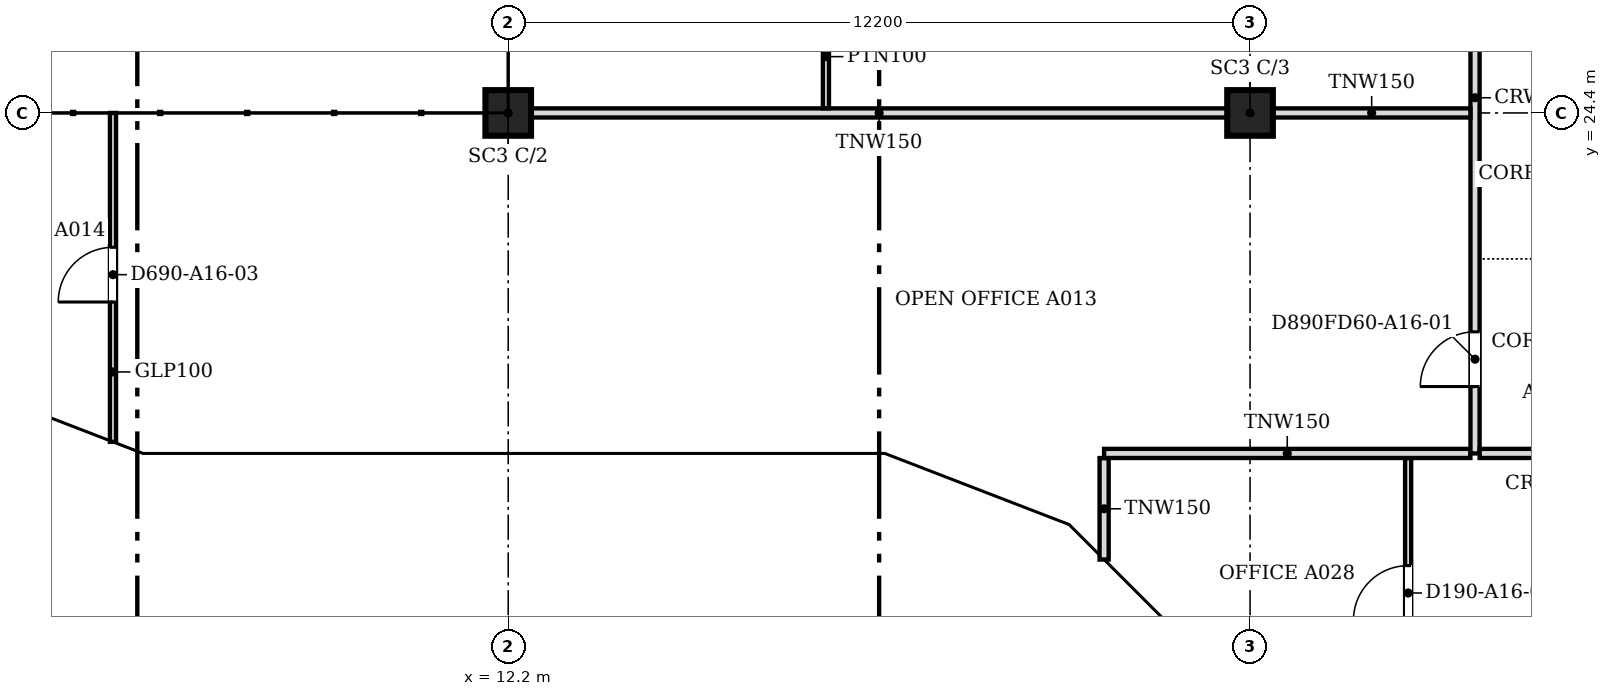
"""IFC4 building model, lengths in metres.
Left out: names, types, materials, properties, quantities, classifications, styles, units other than length and angle.
Written with IfcOpenShell. Run it as: python <this file> out.ifc"""

import sys

from ifc_helpers import new_model, si_unit, direction, frame, frame_2d, origin, origin_2d, place, context, subcontext, project, spatial, polyline, rectangle, outline, extrude, faceted_brep, source, transform, mapped, element, fill, save


model = new_model("IFC4")
c1 = context("Model", 3, precision=1e-05, world=origin(), true_north=direction((0.0, 1.0)))
c2 = subcontext(c1, "Body", "Model", "MODEL_VIEW")
j1 = project(units=[si_unit("LENGTHUNIT", "METRE"), si_unit("PLANEANGLEUNIT", "RADIAN")], contexts=[c1])
p1 = place(None, origin())
s1 = spatial("IfcSite", under=j1, at=p1, CompositionType="ELEMENT")
p2 = place(p1, origin())
s2 = spatial("IfcBuilding", under=s1, at=p2, CompositionType="ELEMENT")
p3 = place(p2, frame((0.0, 0.0, 178.2)))
s3 = spatial("IfcBuildingStorey", under=s2, at=p3, CompositionType="ELEMENT", Elevation=178.2)
for number, where, z_axis, x_axis in (
    (1, (12.2, 24.4, 0.0), (0.0, 0.0, 1.0), (1.0, 0.0, 0.0)),
    (2, (24.4, 24.4, 0.0), (0.0, 0.0, 1.0), (1.0, 0.0, 0.0)),
):
    element("IfcColumn", number, at=place(p3, frame(where, z_axis=z_axis, x_axis=x_axis)), inside=s3, PredefinedType="COLUMN", context=c2, shape_type="SweptSolid", body=[
        extrude(rectangle(XDim=0.75, YDim=0.75, at=origin_2d()), origin(), (0.0, 0.0, 1.0), 3.6),
    ])
m1 = source(origin(), c2, "Body", "Brep", [
    faceted_brep([(2.95, -0.25, 0.0), (2.997, -0.25, 0.059), (2.997, -0.25, 7.541), (2.95, -0.25, 7.6), (0.0, -0.25, 3.8), (0.053, 0.25, 3.868), (2.904, 0.25, 7.54), (2.904, 0.25, 0.06), (0.053, 0.25, 3.732), (2.95, 0.0, 0.0), (2.95, 0.0, 7.6), (0.0, 0.0, 3.8)], [[[0, 1, 2, 3, 4]], [[5, 6, 7, 8]], [[1, 0, 9]], [[10, 3, 2]], [[6, 5, 11, 4, 3, 10]], [[8, 7, 9, 0, 4, 11]], [[8, 11, 5]], [[1, 9, 7, 6, 10, 2]]]),
])
p4 = place(p3, frame((3.394, 19.612, -3.8), z_axis=(0.0, 0.0, 1.0), x_axis=(0.932990326376, -0.359901446078, 0.0)))
e3 = element("IfcWall", 3, at=p4, inside=s3, PredefinedType="SOLIDWALL", context=c2, shape_type="MappedRepresentation", body=[
    mapped(m1, transform((0.0, 0.0, 0.0), scale=1.0)),
])
m2 = source(origin(), c2, "Body", "SweptSolid", [
    extrude(outline(polyline([(2.75, 6.935), (0.316, 3.8), (2.75, 0.665), (2.75, 6.935)])), frame((0.0, 0.26, 0.0), z_axis=(0.0, -1.0, 0.0), x_axis=(1.0, 0.0, 0.0)), (0.0, 0.0, 1.0), 0.52),
])
p5 = place(p4, origin())
e4 = element("IfcOpeningElement", 4, at=p5, cuts=e3, PredefinedType="OPENING", context=c2, shape_type="MappedRepresentation", body=[
    mapped(m2, transform((0.0, 0.0, 0.0), scale=1.0)),
])
m3 = source(origin(), c2, "Body", "Brep", [
    faceted_brep([(0.047, -0.25, 0.0), (3.05, -0.25, 3.8), (0.047, -0.25, 7.6), (0.0, -0.25, 7.54), (0.0, -0.25, 0.06), (0.093, 0.25, 7.541), (3.05, 0.25, 3.8), (0.093, 0.25, 0.059), (0.047, 0.0, 0.0), (0.047, 0.0, 7.6)], [[[0, 1, 2, 3, 4]], [[5, 6, 7]], [[7, 6, 1, 0, 8]], [[6, 5, 9, 2, 1]], [[3, 2, 9]], [[8, 0, 4]], [[7, 8, 4, 3, 9, 5]]]),
])
p6 = place(p3, frame((6.1, 18.55, -3.8), z_axis=(0.0, 0.0, 1.0), x_axis=(1.0, 0.0, 0.0)))
e5 = element("IfcWall", 5, at=p6, inside=s3, PredefinedType="SOLIDWALL", context=c2, shape_type="MappedRepresentation", body=[
    mapped(m3, transform((0.0, 0.0, 0.0), scale=1.0)),
])
m4 = source(origin(), c2, "Body", "SweptSolid", [
    extrude(outline(polyline([(0.247, 0.656), (2.731, 3.8), (0.247, 6.944), (0.247, 0.656)])), frame((0.0, 0.26, 0.0), z_axis=(0.0, -1.0, 0.0), x_axis=(1.0, 0.0, 0.0)), (0.0, 0.0, 1.0), 0.52),
])
p7 = place(p6, origin())
e6 = element("IfcOpeningElement", 6, at=p7, cuts=e5, PredefinedType="OPENING", context=c2, shape_type="MappedRepresentation", body=[
    mapped(m4, transform((0.0, 0.0, 0.0), scale=1.0)),
])
m5 = source(origin(), c2, "Body", "SweptSolid", [
    extrude(outline(polyline([(3.05, 0.0), (6.1, 3.8), (3.05, 7.6), (0.0, 3.8), (3.05, 0.0)])), frame((0.0, 0.25, 0.0), z_axis=(0.0, -1.0, 0.0), x_axis=(1.0, 0.0, 0.0)), (0.0, 0.0, 1.0), 0.5),
])
p8 = place(p3, frame((9.15, 18.55, -3.8), z_axis=(0.0, 0.0, 1.0), x_axis=(1.0, 0.0, 0.0)))
e7 = element("IfcWall", 7, at=p8, inside=s3, PredefinedType="SOLIDWALL", context=c2, shape_type="MappedRepresentation", body=[
    mapped(m5, transform((0.0, 0.0, 0.0), scale=1.0)),
])
m6 = source(origin(), c2, "Body", "SweptSolid", [
    extrude(outline(polyline([(3.05, 0.399), (5.78, 3.8), (3.05, 7.201), (0.321, 3.8), (3.05, 0.399)])), frame((0.0, 0.26, 0.0), z_axis=(0.0, -1.0, 0.0), x_axis=(1.0, 0.0, 0.0)), (0.0, 0.0, 1.0), 0.52),
])
p9 = place(p8, origin())
e8 = element("IfcOpeningElement", 8, at=p9, cuts=e7, PredefinedType="OPENING", context=c2, shape_type="MappedRepresentation", body=[
    mapped(m6, transform((0.0, 0.0, 0.0), scale=1.0)),
])
m7 = source(origin(), c2, "Body", "Brep", [
    faceted_brep([(3.05, -0.25, 7.543), (0.0, -0.25, 3.8), (3.05, -0.25, 0.057), (0.0, 0.25, 3.8), (3.096, 0.25, 7.6), (3.143, 0.25, 7.544), (3.143, 0.25, 0.056), (3.096, 0.25, 0.0), (3.096, -0.0, 0.0), (3.096, -0.0, 7.6)], [[[0, 1, 2]], [[3, 4, 5, 6, 7]], [[7, 6, 8]], [[5, 4, 9]], [[4, 3, 1, 0, 9]], [[3, 7, 8, 2, 1]], [[2, 8, 6, 5, 9, 0]]]),
])
p10 = place(p3, frame((15.25, 18.55, -3.8), z_axis=(0.0, 0.0, 1.0), x_axis=(1.0, 0.0, 0.0)))
e9 = element("IfcWall", 9, at=p10, inside=s3, PredefinedType="SOLIDWALL", context=c2, shape_type="MappedRepresentation", body=[
    mapped(m7, transform((0.0, 0.0, 0.0), scale=1.0)),
])
m8 = source(origin(), c2, "Body", "SweptSolid", [
    extrude(outline(polyline([(2.896, 6.959), (0.323, 3.8), (2.896, 0.641), (2.896, 6.959)])), frame((0.0, 0.26, 0.0), z_axis=(0.0, -1.0, 0.0), x_axis=(1.0, 0.0, 0.0)), (0.0, 0.0, 1.0), 0.52),
])
p11 = place(p10, origin())
e10 = element("IfcOpeningElement", 10, at=p11, cuts=e9, PredefinedType="OPENING", context=c2, shape_type="MappedRepresentation", body=[
    mapped(m8, transform((0.0, 0.0, 0.0), scale=1.0)),
])
m9 = source(origin(), c2, "Body", "Brep", [
    faceted_brep([(0.093, -0.25, 0.056), (3.143, -0.25, 3.736), (3.143, -0.25, 3.864), (0.093, -0.25, 7.544), (0.0, 0.25, 7.543), (0.047, 0.25, 7.6), (3.196, 0.25, 3.8), (0.047, 0.25, 0.0), (0.0, 0.25, 0.057), (3.196, -0.0, 3.8), (0.047, 0.0, 0.0), (0.047, 0.0, 7.6)], [[[0, 1, 2, 3]], [[4, 5, 6, 7, 8]], [[7, 6, 9, 1, 0, 10]], [[6, 5, 11, 3, 2, 9]], [[5, 4, 11]], [[8, 7, 10]], [[8, 10, 0, 3, 11, 4]], [[1, 9, 2]]]),
])
p12 = place(p3, frame((18.303, 18.567, -3.8), z_axis=(0.0, 0.0, 1.0), x_axis=(0.932978940178, -0.359930961693, 0.0)))
e11 = element("IfcWall", 11, at=p12, inside=s3, PredefinedType="SOLIDWALL", context=c2, shape_type="MappedRepresentation", body=[
    mapped(m9, transform((0.0, 0.0, 0.0), scale=1.0)),
])
m10 = source(origin(), c2, "Body", "SweptSolid", [
    extrude(outline(polyline([(0.247, 0.633), (2.871, 3.8), (0.247, 6.967), (0.247, 0.633)])), frame((0.0, 0.26, 0.0), z_axis=(0.0, -1.0, 0.0), x_axis=(1.0, 0.0, 0.0)), (0.0, 0.0, 1.0), 0.52),
])
p13 = place(p12, origin())
e12 = element("IfcOpeningElement", 12, at=p13, cuts=e11, PredefinedType="OPENING", context=c2, shape_type="MappedRepresentation", body=[
    mapped(m10, transform((0.0, 0.0, 0.0), scale=1.0)),
])
m11 = source(origin(), c2, "Body", "Brep", [
    faceted_brep([(3.103, -0.25, 7.536), (0.053, -0.25, 3.864), (0.053, -0.25, 3.736), (3.103, -0.25, 0.064), (0.0, 0.25, 3.8), (3.156, 0.25, 7.6), (3.209, 0.25, 7.536), (3.209, 0.25, 0.064), (3.156, 0.25, 0.0), (3.156, -0.0, 0.0), (3.156, -0.0, 7.6), (0.0, 0.0, 3.8)], [[[0, 1, 2, 3]], [[4, 5, 6, 7, 8]], [[8, 7, 9]], [[6, 5, 10]], [[5, 4, 11, 1, 0, 10]], [[4, 8, 9, 3, 2, 11]], [[11, 2, 1]], [[3, 9, 7, 6, 10, 0]]]),
])
p14 = place(p3, frame((21.285, 17.417, -3.8), z_axis=(0.0, 0.0, 1.0), x_axis=(0.707106781187, -0.707106781187, 0.0)))
e13 = element("IfcWall", 13, at=p14, inside=s3, PredefinedType="SOLIDWALL", context=c2, shape_type="MappedRepresentation", body=[
    mapped(m11, transform((0.0, 0.0, 0.0), scale=1.0)),
])
m12 = source(origin(), c2, "Body", "SweptSolid", [
    extrude(outline(polyline([(2.956, 6.968), (0.325, 3.8), (2.956, 0.632), (2.956, 6.968)])), frame((0.0, 0.26, 0.0), z_axis=(0.0, -1.0, 0.0), x_axis=(1.0, 0.0, 0.0)), (0.0, 0.0, 1.0), 0.52),
])
p15 = place(p14, origin())
e14 = element("IfcOpeningElement", 14, at=p15, cuts=e13, PredefinedType="OPENING", context=c2, shape_type="MappedRepresentation", body=[
    mapped(m12, transform((0.0, 0.0, 0.0), scale=1.0)),
])
p16 = place(p2, frame((0.0, 0.0, 182.0)))
s4 = spatial("IfcBuildingStorey", under=s2, at=p16, CompositionType="ELEMENT", Elevation=182.0)
m13 = source(origin(), c2, "Body", "Brep", [
    faceted_brep([(0.053, -0.25, 0.0), (3.003, -0.25, 3.8), (0.053, -0.25, 7.6), (0.0, -0.25, 7.532), (0.0, -0.25, 0.068), (0.106, 0.25, 7.532), (2.957, 0.25, 3.86), (2.957, 0.25, 3.74), (0.106, 0.25, 0.068), (3.003, 0.0, 3.8), (0.053, 0.0, 0.0), (0.053, 0.0, 7.6)], [[[0, 1, 2, 3, 4]], [[5, 6, 7, 8]], [[8, 7, 9, 1, 0, 10]], [[6, 5, 11, 2, 1, 9]], [[3, 2, 11]], [[10, 0, 4]], [[8, 10, 4, 3, 11, 5]], [[9, 7, 6]]]),
])
p17 = place(p16, frame((3.344, 19.631, -3.8), z_axis=(0.0, 0.0, 1.0), x_axis=(0.933007896601, -0.359855894603, 0.0)))
e15 = element("IfcWall", 15, at=p17, inside=s4, PredefinedType="SOLIDWALL", context=c2, shape_type="MappedRepresentation", body=[
    mapped(m13, transform((0.0, 0.0, 0.0), scale=1.0)),
])
m14 = source(origin(), c2, "Body", "SweptSolid", [
    extrude(outline(polyline([(0.253, 0.665), (2.687, 3.8), (0.253, 6.935), (0.253, 0.665)])), frame((0.0, 0.26, 0.0), z_axis=(0.0, -1.0, 0.0), x_axis=(1.0, 0.0, 0.0)), (0.0, 0.0, 1.0), 0.52),
])
p18 = place(p17, origin())
e16 = element("IfcOpeningElement", 16, at=p18, cuts=e15, PredefinedType="OPENING", context=c2, shape_type="MappedRepresentation", body=[
    mapped(m14, transform((0.0, 0.0, 0.0), scale=1.0)),
])
m15 = source(origin(), c2, "Body", "Brep", [
    faceted_brep([(3.003, -0.25, 0.0), (6.053, -0.25, 3.8), (3.003, -0.25, 7.6), (0.0, -0.25, 3.8), (0.047, 0.25, 3.859), (3.003, 0.25, 7.6), (6.053, 0.25, 3.8), (3.003, 0.25, 0.0), (0.047, 0.25, 3.741), (0.0, 0.0, 3.8)], [[[0, 1, 2, 3]], [[4, 5, 6, 7, 8]], [[7, 6, 1, 0]], [[6, 5, 2, 1]], [[5, 4, 9, 3, 2]], [[8, 7, 0, 3, 9]], [[8, 9, 4]]]),
])
p19 = place(p16, frame((6.146, 18.55, -3.8), z_axis=(0.0, 0.0, 1.0), x_axis=(1.0, 0.0, 0.0)))
e17 = element("IfcWall", 17, at=p19, inside=s4, PredefinedType="SOLIDWALL", context=c2, shape_type="MappedRepresentation", body=[
    mapped(m15, transform((0.0, 0.0, 0.0), scale=1.0)),
])
m16 = source(origin(), c2, "Body", "SweptSolid", [
    extrude(outline(polyline([(3.005, 0.401), (5.733, 3.8), (3.005, 7.199), (0.319, 3.8), (3.005, 0.401)])), frame((0.0, 0.26, 0.0), z_axis=(0.0, -1.0, 0.0), x_axis=(1.0, 0.0, 0.0)), (0.0, 0.0, 1.0), 0.52),
])
p20 = place(p19, origin())
e18 = element("IfcOpeningElement", 18, at=p20, cuts=e17, PredefinedType="OPENING", context=c2, shape_type="MappedRepresentation", body=[
    mapped(m16, transform((0.0, 0.0, 0.0), scale=1.0)),
])
m17 = source(origin(), c2, "Body", "Brep", [
    faceted_brep([(3.05, -0.25, 0.0), (6.1, -0.25, 3.743), (6.1, -0.25, 3.857), (3.05, -0.25, 7.6), (0.0, -0.25, 3.8), (0.0, 0.25, 3.8), (3.05, 0.25, 7.6), (6.146, 0.25, 3.8), (3.05, 0.25, 0.0), (6.146, -0.0, 3.8)], [[[0, 1, 2, 3, 4]], [[5, 6, 7, 8]], [[8, 7, 9, 1, 0]], [[7, 6, 3, 2, 9]], [[6, 5, 4, 3]], [[5, 8, 0, 4]], [[1, 9, 2]]]),
])
p21 = place(p16, frame((12.2, 18.55, -3.8), z_axis=(0.0, 0.0, 1.0), x_axis=(1.0, 0.0, 0.0)))
e19 = element("IfcWall", 19, at=p21, inside=s4, PredefinedType="SOLIDWALL", context=c2, shape_type="MappedRepresentation", body=[
    mapped(m17, transform((0.0, 0.0, 0.0), scale=1.0)),
])
m18 = source(origin(), c2, "Body", "SweptSolid", [
    extrude(outline(polyline([(3.052, 0.398), (5.824, 3.8), (3.052, 7.202), (0.321, 3.8), (3.052, 0.398)])), frame((0.0, 0.26, 0.0), z_axis=(0.0, -1.0, 0.0), x_axis=(1.0, 0.0, 0.0)), (0.0, 0.0, 1.0), 0.52),
])
p22 = place(p21, origin())
e20 = element("IfcOpeningElement", 20, at=p22, cuts=e19, PredefinedType="OPENING", context=c2, shape_type="MappedRepresentation", body=[
    mapped(m18, transform((0.0, 0.0, 0.0), scale=1.0)),
])
m19 = source(origin(), c2, "Body", "Brep", [
    faceted_brep([(3.096, -0.25, 7.536), (0.047, -0.25, 3.856), (0.047, -0.25, 3.744), (3.096, -0.25, 0.064), (0.0, 0.25, 3.8), (3.149, 0.25, 7.6), (3.202, 0.25, 7.536), (3.202, 0.25, 0.064), (3.149, 0.25, 0.0), (3.149, -0.0, 0.0), (3.149, -0.0, 7.6), (0.0, 0.0, 3.8)], [[[0, 1, 2, 3]], [[4, 5, 6, 7, 8]], [[8, 7, 9]], [[6, 5, 10]], [[5, 4, 11, 1, 0, 10]], [[4, 8, 9, 3, 2, 11]], [[11, 2, 1]], [[3, 9, 7, 6, 10, 0]]]),
])
p23 = place(p16, frame((18.346, 18.55, -3.8), z_axis=(0.0, 0.0, 1.0), x_axis=(0.932985567668, -0.359913782069, 0.0)))
e21 = element("IfcWall", 21, at=p23, inside=s4, PredefinedType="SOLIDWALL", context=c2, shape_type="MappedRepresentation", body=[
    mapped(m19, transform((0.0, 0.0, 0.0), scale=1.0)),
])
m20 = source(origin(), c2, "Body", "SweptSolid", [
    extrude(outline(polyline([(2.949, 6.967), (0.325, 3.8), (2.949, 0.633), (2.949, 6.967)])), frame((0.0, 0.26, 0.0), z_axis=(0.0, -1.0, 0.0), x_axis=(1.0, 0.0, 0.0)), (0.0, 0.0, 1.0), 0.52),
])
p24 = place(p23, origin())
e22 = element("IfcOpeningElement", 22, at=p24, cuts=e21, PredefinedType="OPENING", context=c2, shape_type="MappedRepresentation", body=[
    mapped(m20, transform((0.0, 0.0, 0.0), scale=1.0)),
])
m21 = source(origin(), c2, "Body", "Brep", [
    faceted_brep([(0.106, -0.25, 0.064), (3.156, -0.25, 3.736), (3.156, -0.25, 3.864), (0.106, -0.25, 7.536), (0.0, 0.25, 7.536), (0.053, 0.25, 7.6), (3.209, 0.25, 3.8), (0.053, 0.25, 0.0), (0.0, 0.25, 0.064), (3.209, -0.0, 3.8), (0.053, 0.0, 0.0), (0.053, 0.0, 7.6)], [[[0, 1, 2, 3]], [[4, 5, 6, 7, 8]], [[7, 6, 9, 1, 0, 10]], [[6, 5, 11, 3, 2, 9]], [[5, 4, 11]], [[8, 7, 10]], [[8, 10, 0, 3, 11, 4]], [[1, 9, 2]]]),
])
p25 = place(p16, frame((21.248, 17.454, -3.8), z_axis=(0.0, 0.0, 1.0), x_axis=(0.707106781187, -0.707106781187, 0.0)))
e23 = element("IfcWall", 23, at=p25, inside=s4, PredefinedType="SOLIDWALL", context=c2, shape_type="MappedRepresentation", body=[
    mapped(m21, transform((0.0, 0.0, 0.0), scale=1.0)),
])
m22 = source(origin(), c2, "Body", "SweptSolid", [
    extrude(outline(polyline([(0.253, 0.632), (2.884, 3.8), (0.253, 6.968), (0.253, 0.632)])), frame((0.0, 0.26, 0.0), z_axis=(0.0, -1.0, 0.0), x_axis=(1.0, 0.0, 0.0)), (0.0, 0.0, 1.0), 0.52),
])
p26 = place(p25, origin())
e24 = element("IfcOpeningElement", 24, at=p26, cuts=e23, PredefinedType="OPENING", context=c2, shape_type="MappedRepresentation", body=[
    mapped(m22, transform((0.0, 0.0, 0.0), scale=1.0)),
])
p27 = place(p3, frame((27.0, 10.276, 0.0), z_axis=(0.0, 0.0, 1.0), x_axis=(0.0, 1.0, 0.0)))
e25 = element("IfcWall", 25, at=p27, inside=s3, PredefinedType="PARTITIONING", context=c2, shape_type="SweptSolid", body=[
    extrude(rectangle(XDim=8.448, YDim=0.1, at=frame_2d((4.224, 0.0))), origin(), (0.0, 0.0, 1.0), 3.067),
])
m23 = source(origin(), c2, "Body", "SweptSolid", [
    extrude(rectangle(XDim=0.9, YDim=2.1, at=frame_2d((0.45, 1.05))), frame((0.0, 0.06, 0.0), z_axis=(0.0, -1.0, 0.0), x_axis=(1.0, 0.0, 0.0)), (0.0, 0.0, 1.0), 0.12),
])
p28 = place(p27, frame((1.6, 0.0, 0.0)))
e26 = element("IfcOpeningElement", 26, at=p28, cuts=e25, PredefinedType="OPENING", context=c2, shape_type="MappedRepresentation", body=[
    mapped(m23, transform((0.0, 0.0, 0.0), scale=1.0)),
])
p29 = place(p27, frame((5.779, 0.0, 0.0)))
e27 = element("IfcOpeningElement", 27, at=p29, cuts=e25, PredefinedType="OPENING", context=c2, shape_type="MappedRepresentation", body=[
    mapped(m23, transform((0.0, 0.0, 0.0), scale=1.0)),
])
p30 = place(p3, frame((22.0, 17.055, 0.0), z_axis=(0.0, 0.0, 1.0), x_axis=(0.0, 1.0, 0.0)))
e28 = element("IfcWall", 28, at=p30, inside=s3, PredefinedType="PARTITIONING", context=c2, shape_type="SweptSolid", body=[
    extrude(rectangle(XDim=1.669, YDim=0.15, at=frame_2d((0.834, 0.0))), origin(), (0.0, 0.0, 1.0), 3.067),
])
p31 = place(p3, frame((22.0, 18.8, 0.0), z_axis=(0.0, 0.0, 1.0), x_axis=(1.0, 0.0, 0.0)))
e29 = element("IfcWall", 29, at=p31, inside=s3, PredefinedType="PARTITIONING", context=c2, shape_type="SweptSolid", body=[
    extrude(rectangle(XDim=6.024, YDim=0.15, at=frame_2d((3.012, 0.0))), origin(), (0.0, 0.0, 1.0), 3.067),
])
p32 = place(p3, frame((28.1, 18.8, 0.0), z_axis=(0.0, 0.0, 1.0), x_axis=(0.0, 1.0, 0.0)))
e30 = element("IfcWall", 30, at=p32, inside=s3, PredefinedType="PARTITIONING", context=c2, shape_type="SweptSolid", body=[
    extrude(rectangle(XDim=26.024, YDim=0.15, at=frame_2d((13.012, 0.0))), origin(), (0.0, 0.0, 1.0), 3.067),
])
m24 = source(origin(), c2, "Body", "SweptSolid", [
    extrude(rectangle(XDim=0.9, YDim=2.1, at=frame_2d((0.45, 1.05))), frame((0.0, 0.085, 0.0), z_axis=(0.0, -1.0, 0.0), x_axis=(1.0, 0.0, 0.0)), (0.0, 0.0, 1.0), 0.17),
])
p33 = place(p32, frame((1.1, 0.0, 0.0)))
e31 = element("IfcOpeningElement", 31, at=p33, cuts=e30, PredefinedType="OPENING", context=c2, shape_type="MappedRepresentation", body=[
    mapped(m24, transform((0.0, 0.0, 0.0), scale=1.0)),
])
p34 = place(p32, frame((22.951, 0.0, 0.0)))
e32 = element("IfcOpeningElement", 32, at=p34, cuts=e30, PredefinedType="OPENING", context=c2, shape_type="MappedRepresentation", body=[
    mapped(m24, transform((0.0, 0.0, 0.0), scale=1.0)),
])
m25 = source(origin(), c2, "Body", "SweptSolid", [
    extrude(rectangle(XDim=1.0, YDim=2.1, at=frame_2d((0.5, 1.05))), frame((0.0, 0.085, 0.0), z_axis=(0.0, -1.0, 0.0), x_axis=(1.0, 0.0, 0.0)), (0.0, 0.0, 1.0), 0.17),
])
p35 = place(p32, frame((17.251, 0.0, 0.0)))
e33 = element("IfcOpeningElement", 33, at=p35, cuts=e30, PredefinedType="OPENING", context=c2, shape_type="MappedRepresentation", body=[
    mapped(m25, transform((0.0, 0.0, 0.0), scale=1.0)),
])
p36 = place(p32, frame((9.7, 0.0, 0.0)))
e34 = element("IfcOpeningElement", 34, at=p36, cuts=e30, PredefinedType="OPENING", context=c2, shape_type="MappedRepresentation", body=[
    mapped(m24, transform((0.0, 0.0, 0.0), scale=1.0)),
])
p37 = place(p3, frame((28.176, 18.8, 0.0), z_axis=(0.0, 0.0, 1.0), x_axis=(1.0, 0.0, 0.0)))
e35 = element("IfcWall", 35, at=p37, inside=s3, PredefinedType="PARTITIONING", context=c2, shape_type="SweptSolid", body=[
    extrude(rectangle(XDim=2.248, YDim=0.15, at=frame_2d((1.124, 0.0))), origin(), (0.0, 0.0, 1.0), 3.067),
])
p38 = place(p3, frame((5.7, 18.99, 0.0), z_axis=(0.0, 0.0, 1.0), x_axis=(0.0, 1.0, 0.0)))
e36 = element("IfcWall", 36, at=p38, inside=s3, PredefinedType="PARTITIONING", context=c2, shape_type="SweptSolid", body=[
    extrude(rectangle(XDim=5.41, YDim=0.1, at=frame_2d((2.705, 0.0))), origin(), (0.0, 0.0, 1.0), 3.067),
])
p39 = place(p38, frame((2.3, 0.0, 0.0)))
e37 = element("IfcOpeningElement", 37, at=p39, cuts=e36, PredefinedType="OPENING", context=c2, shape_type="MappedRepresentation", body=[
    mapped(m23, transform((0.0, 0.0, 0.0), scale=1.0)),
])
p40 = place(p3, frame((12.576, 24.4, 0.0), z_axis=(0.0, 0.0, 1.0), x_axis=(1.0, 0.0, 0.0)))
e38 = element("IfcWall", 38, at=p40, inside=s3, PredefinedType="PARTITIONING", context=c2, shape_type="SweptSolid", body=[
    extrude(rectangle(XDim=11.448, YDim=0.15, at=frame_2d((5.724, 0.0))), origin(), (0.0, 0.0, 1.0), 3.067),
])
p41 = place(p3, frame((24.776, 24.4, 0.0), z_axis=(0.0, 0.0, 1.0), x_axis=(1.0, 0.0, 0.0)))
e39 = element("IfcWall", 39, at=p41, inside=s3, PredefinedType="PARTITIONING", context=c2, shape_type="SweptSolid", body=[
    extrude(rectangle(XDim=3.248, YDim=0.15, at=frame_2d((1.624, 0.0))), origin(), (0.0, 0.0, 1.0), 3.067),
])
p42 = place(p3, frame((17.425, 24.476, 0.0), z_axis=(0.0, 0.0, 1.0), x_axis=(0.0, 1.0, 0.0)))
e40 = element("IfcWall", 40, at=p42, inside=s3, PredefinedType="PARTITIONING", context=c2, shape_type="SweptSolid", body=[
    extrude(rectangle(XDim=4.293, YDim=0.1, at=frame_2d((2.146, 0.0))), origin(), (0.0, 0.0, 1.0), 3.067),
])
p43 = place(p42, frame((1.7, 0.0, 0.0)))
e41 = element("IfcOpeningElement", 41, at=p43, cuts=e40, PredefinedType="OPENING", context=c2, shape_type="MappedRepresentation", body=[
    mapped(m23, transform((0.0, 0.0, 0.0), scale=1.0)),
])
m26 = source(origin(), c2, "Body", "SweptSolid", [
    extrude(rectangle(XDim=0.9, YDim=2.1, at=frame_2d((0.45, 1.05))), frame((0.0, 0.025, 0.0), z_axis=(0.0, -1.0, 0.0), x_axis=(1.0, 0.0, 0.0)), (0.0, 0.0, 1.0), 0.05),
])
p44 = place(p33, origin())
e42 = element("IfcDoor", 42, at=p44, inside=s3, OperationType="SINGLE_SWING_LEFT", PredefinedType="DOOR", context=c2, shape_type="MappedRepresentation", body=[
    mapped(m26, transform((0.0, 0.0, 0.0), scale=1.0)),
])
fill(e31, e42)
p45 = place(p29, origin())
e43 = element("IfcDoor", 43, at=p45, inside=s3, OperationType="SINGLE_SWING_LEFT", PredefinedType="DOOR", context=c2, shape_type="MappedRepresentation", body=[
    mapped(m26, transform((0.0, 0.0, 0.0), scale=1.0)),
])
fill(e27, e43)
p46 = place(p39, origin())
e44 = element("IfcDoor", 44, at=p46, inside=s3, OperationType="SINGLE_SWING_LEFT", PredefinedType="DOOR", context=c2, shape_type="MappedRepresentation", body=[
    mapped(m26, transform((0.0, 0.0, 0.0), scale=1.0)),
])
fill(e37, e44)
save(model, sys.argv[1])
